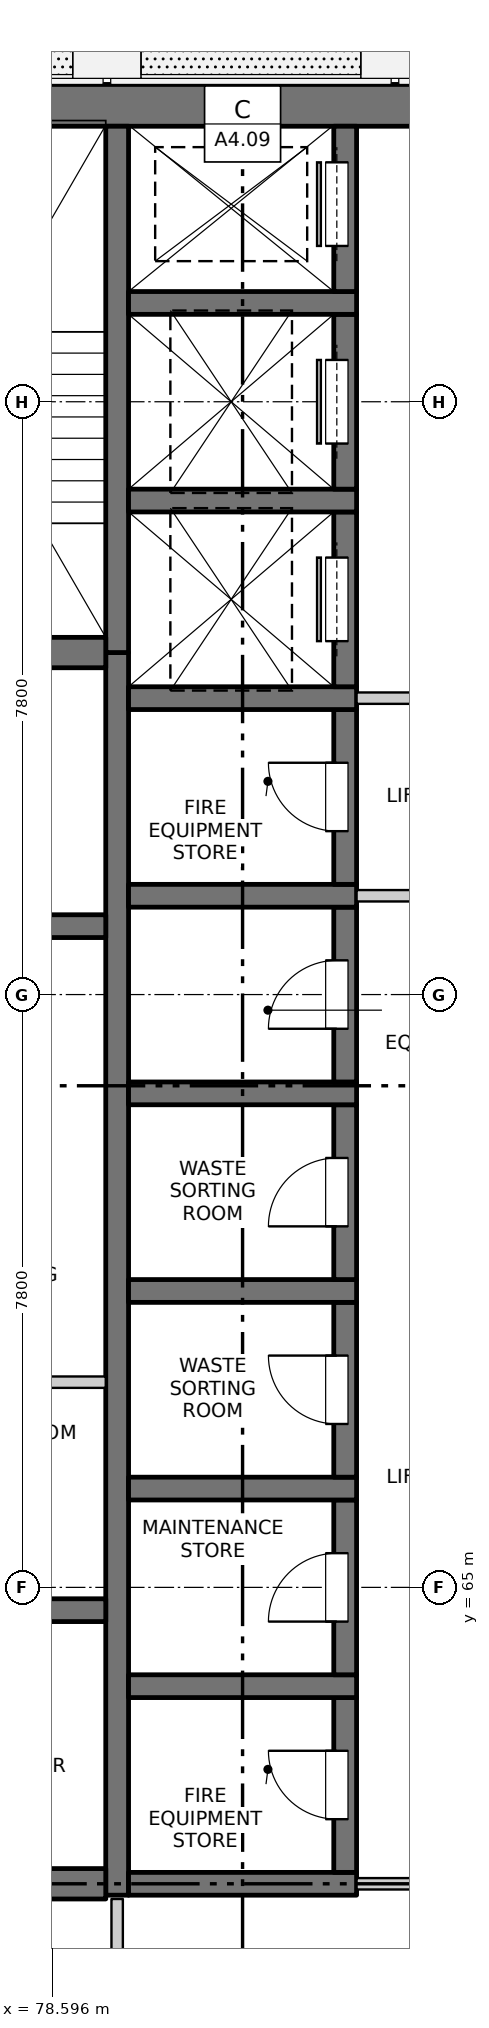
"""IFC4 building model, lengths in metres.
Left out: names, types, materials, properties, quantities, classifications, styles, units other than length and angle.
Written with IfcOpenShell. Run it as: python <this file> out.ifc"""

import sys

from ifc_helpers import new_model, si_unit, direction, frame, frame_2d, origin, place, context, subcontext, project, spatial, rectangle, extrude, element, fill, save


model = new_model("IFC4")
c1 = context("Model", 3, precision=1e-05, world=origin(), true_north=direction((0.0, 1.0)))
c2 = subcontext(c1, "Body", "Model", "MODEL_VIEW")
j1 = project(units=[si_unit("LENGTHUNIT", "METRE"), si_unit("PLANEANGLEUNIT", "RADIAN")], contexts=[c1])
p1 = place(None, origin())
s1 = spatial("IfcSite", under=j1, at=p1, CompositionType="ELEMENT")
p2 = place(p1, origin())
s2 = spatial("IfcBuilding", under=s1, at=p2, CompositionType="ELEMENT")
p3 = place(p2, frame((0.0, 0.0, 179.2)))
s3 = spatial("IfcBuildingStorey", under=s2, at=p3, CompositionType="ELEMENT", Elevation=179.2)
p4 = place(p3, frame((75.525, 84.5, -0.3), z_axis=(0.0, 0.0, 1.0), x_axis=(1.0, 0.0, 0.0)))
e1 = element("IfcWall", 1, at=p4, inside=s3, PredefinedType="SOLIDWALL", context=c2, shape_type="SweptSolid", body=[
    extrude(rectangle(XDim=18.95, YDim=0.55, at=frame_2d((9.475, 0.0))), origin(), (0.0, 0.0, 1.0), 3.45),
])
p5 = place(p3, frame((79.45, 60.95, -0.3), z_axis=(0.0, 0.0, 1.0), x_axis=(0.0, 1.0, 0.0)))
e2 = element("IfcWall", 2, at=p5, inside=s3, PredefinedType="SOLIDWALL", context=c2, shape_type="SweptSolid", body=[
    extrude(rectangle(XDim=16.35, YDim=0.3, at=frame_2d((8.175, 0.0))), origin(), (0.0, 0.0, 1.0), 3.45),
])
p6 = place(p3, frame((79.45, 77.3, -0.3), z_axis=(0.0, 0.0, 1.0), x_axis=(0.0, 1.0, 0.0)))
e3 = element("IfcWall", 3, at=p6, inside=s3, PredefinedType="SOLIDWALL", context=c2, shape_type="SweptSolid", body=[
    extrude(rectangle(XDim=6.925, YDim=0.3, at=frame_2d((3.462, 0.0))), origin(), (0.0, 0.0, 1.0), 3.45),
])
p7 = place(p3, frame((79.6, 61.1, -0.3), z_axis=(0.0, 0.0, 1.0), x_axis=(1.0, 0.0, 0.0)))
e4 = element("IfcWall", 4, at=p7, inside=s3, PredefinedType="SOLIDWALL", context=c2, shape_type="SweptSolid", body=[
    extrude(rectangle(XDim=3.0, YDim=0.3, at=frame_2d((1.5, 0.0))), origin(), (0.0, 0.0, 1.0), 3.45),
])
p8 = place(p3, frame((82.45, 61.25, -0.3), z_axis=(0.0, 0.0, 1.0), x_axis=(0.0, 1.0, 0.0)))
e5 = element("IfcWall", 5, at=p8, inside=s3, PredefinedType="SOLIDWALL", context=c2, shape_type="SweptSolid", body=[
    extrude(rectangle(XDim=2.3, YDim=0.3, at=frame_2d((1.15, 0.0))), origin(), (0.0, 0.0, 1.0), 3.45),
])
p9 = place(p8, frame((0.7, 0.0, 0.3)))
e6 = element("IfcOpeningElement", 6, at=p9, cuts=e5, PredefinedType="OPENING", context=c2, shape_type="SweptSolid", body=[
    extrude(rectangle(XDim=0.9, YDim=2.1, at=frame_2d((0.45, 1.05))), frame((0.0, 0.16, 0.0), z_axis=(0.0, -1.0, 0.0), x_axis=(1.0, 0.0, 0.0)), (0.0, 0.0, 1.0), 0.32),
])
p10 = place(p3, frame((79.6, 63.7, -0.3), z_axis=(0.0, 0.0, 1.0), x_axis=(1.0, 0.0, 0.0)))
e7 = element("IfcWall", 7, at=p10, inside=s3, PredefinedType="SOLIDWALL", context=c2, shape_type="SweptSolid", body=[
    extrude(rectangle(XDim=3.0, YDim=0.3, at=frame_2d((1.5, 0.0))), origin(), (0.0, 0.0, 1.0), 3.45),
])
p11 = place(p3, frame((82.45, 63.85, -0.3), z_axis=(0.0, 0.0, 1.0), x_axis=(0.0, 1.0, 0.0)))
e8 = element("IfcWall", 8, at=p11, inside=s3, PredefinedType="SOLIDWALL", context=c2, shape_type="SweptSolid", body=[
    extrude(rectangle(XDim=2.3, YDim=0.3, at=frame_2d((1.15, 0.0))), origin(), (0.0, 0.0, 1.0), 3.45),
])
p12 = place(p11, frame((0.7, 0.0, 0.3)))
e9 = element("IfcOpeningElement", 9, at=p12, cuts=e8, PredefinedType="OPENING", context=c2, shape_type="SweptSolid", body=[
    extrude(rectangle(XDim=0.9, YDim=2.1, at=frame_2d((0.45, 1.05))), frame((0.0, 0.16, 0.0), z_axis=(0.0, -1.0, 0.0), x_axis=(1.0, 0.0, 0.0)), (0.0, 0.0, 1.0), 0.32),
])
p13 = place(p3, frame((79.6, 66.3, -0.3), z_axis=(0.0, 0.0, 1.0), x_axis=(1.0, 0.0, 0.0)))
e10 = element("IfcWall", 10, at=p13, inside=s3, PredefinedType="SOLIDWALL", context=c2, shape_type="SweptSolid", body=[
    extrude(rectangle(XDim=3.0, YDim=0.3, at=frame_2d((1.5, 0.0))), origin(), (0.0, 0.0, 1.0), 3.45),
])
p14 = place(p3, frame((82.45, 66.45, -0.3), z_axis=(0.0, 0.0, 1.0), x_axis=(0.0, 1.0, 0.0)))
e11 = element("IfcWall", 11, at=p14, inside=s3, PredefinedType="SOLIDWALL", context=c2, shape_type="SweptSolid", body=[
    extrude(rectangle(XDim=2.3, YDim=0.3, at=frame_2d((1.15, 0.0))), origin(), (0.0, 0.0, 1.0), 3.45),
])
p15 = place(p14, frame((0.7, 0.0, 0.3)))
e12 = element("IfcOpeningElement", 12, at=p15, cuts=e11, PredefinedType="OPENING", context=c2, shape_type="SweptSolid", body=[
    extrude(rectangle(XDim=0.9, YDim=2.1, at=frame_2d((0.45, 1.05))), frame((0.0, 0.16, 0.0), z_axis=(0.0, -1.0, 0.0), x_axis=(1.0, 0.0, 0.0)), (0.0, 0.0, 1.0), 0.32),
])
p16 = place(p3, frame((79.6, 68.9, -0.3), z_axis=(0.0, 0.0, 1.0), x_axis=(1.0, 0.0, 0.0)))
e13 = element("IfcWall", 13, at=p16, inside=s3, PredefinedType="SOLIDWALL", context=c2, shape_type="SweptSolid", body=[
    extrude(rectangle(XDim=3.0, YDim=0.3, at=frame_2d((1.5, 0.0))), origin(), (0.0, 0.0, 1.0), 3.45),
])
p17 = place(p3, frame((82.45, 69.05, -0.3), z_axis=(0.0, 0.0, 1.0), x_axis=(0.0, 1.0, 0.0)))
e14 = element("IfcWall", 14, at=p17, inside=s3, PredefinedType="SOLIDWALL", context=c2, shape_type="SweptSolid", body=[
    extrude(rectangle(XDim=2.3, YDim=0.3, at=frame_2d((1.15, 0.0))), origin(), (0.0, 0.0, 1.0), 3.45),
])
p18 = place(p17, frame((0.7, 0.0, 0.3)))
e15 = element("IfcOpeningElement", 15, at=p18, cuts=e14, PredefinedType="OPENING", context=c2, shape_type="SweptSolid", body=[
    extrude(rectangle(XDim=0.9, YDim=2.1, at=frame_2d((0.45, 1.05))), frame((0.0, 0.16, 0.0), z_axis=(0.0, -1.0, 0.0), x_axis=(1.0, 0.0, 0.0)), (0.0, 0.0, 1.0), 0.32),
])
p19 = place(p3, frame((79.6, 71.5, -0.3), z_axis=(0.0, 0.0, 1.0), x_axis=(1.0, 0.0, 0.0)))
e16 = element("IfcWall", 16, at=p19, inside=s3, PredefinedType="SOLIDWALL", context=c2, shape_type="SweptSolid", body=[
    extrude(rectangle(XDim=3.0, YDim=0.3, at=frame_2d((1.5, 0.0))), origin(), (0.0, 0.0, 1.0), 3.45),
])
p20 = place(p3, frame((82.45, 71.65, -0.3), z_axis=(0.0, 0.0, 1.0), x_axis=(0.0, 1.0, 0.0)))
e17 = element("IfcWall", 17, at=p20, inside=s3, PredefinedType="SOLIDWALL", context=c2, shape_type="SweptSolid", body=[
    extrude(rectangle(XDim=2.3, YDim=0.3, at=frame_2d((1.15, 0.0))), origin(), (0.0, 0.0, 1.0), 3.45),
])
p21 = place(p20, frame((0.7, 0.0, 0.3)))
e18 = element("IfcOpeningElement", 18, at=p21, cuts=e17, PredefinedType="OPENING", context=c2, shape_type="SweptSolid", body=[
    extrude(rectangle(XDim=0.9, YDim=2.1, at=frame_2d((0.45, 1.05))), frame((0.0, 0.16, 0.0), z_axis=(0.0, -1.0, 0.0), x_axis=(1.0, 0.0, 0.0)), (0.0, 0.0, 1.0), 0.32),
])
p22 = place(p3, frame((79.6, 74.1, -0.3), z_axis=(0.0, 0.0, 1.0), x_axis=(1.0, 0.0, 0.0)))
e19 = element("IfcWall", 19, at=p22, inside=s3, PredefinedType="SOLIDWALL", context=c2, shape_type="SweptSolid", body=[
    extrude(rectangle(XDim=3.0, YDim=0.3, at=frame_2d((1.5, 0.0))), origin(), (0.0, 0.0, 1.0), 3.45),
])
p23 = place(p3, frame((82.45, 74.25, -0.3), z_axis=(0.0, 0.0, 1.0), x_axis=(0.0, 1.0, 0.0)))
e20 = element("IfcWall", 20, at=p23, inside=s3, PredefinedType="SOLIDWALL", context=c2, shape_type="SweptSolid", body=[
    extrude(rectangle(XDim=2.3, YDim=0.3, at=frame_2d((1.15, 0.0))), origin(), (0.0, 0.0, 1.0), 3.45),
])
p24 = place(p23, frame((0.7, 0.0, 0.3)))
e21 = element("IfcOpeningElement", 21, at=p24, cuts=e20, PredefinedType="OPENING", context=c2, shape_type="SweptSolid", body=[
    extrude(rectangle(XDim=0.9, YDim=2.1, at=frame_2d((0.45, 1.05))), frame((0.0, 0.16, 0.0), z_axis=(0.0, -1.0, 0.0), x_axis=(1.0, 0.0, 0.0)), (0.0, 0.0, 1.0), 0.32),
])
p25 = place(p3, frame((79.6, 76.7, -0.3), z_axis=(0.0, 0.0, 1.0), x_axis=(1.0, 0.0, 0.0)))
e22 = element("IfcWall", 22, at=p25, inside=s3, PredefinedType="SOLIDWALL", context=c2, shape_type="SweptSolid", body=[
    extrude(rectangle(XDim=3.0, YDim=0.3, at=frame_2d((1.5, 0.0))), origin(), (0.0, 0.0, 1.0), 3.45),
])
p26 = place(p3, frame((82.45, 76.85, -0.3), z_axis=(0.0, 0.0, 1.0), x_axis=(0.0, 1.0, 0.0)))
e23 = element("IfcWall", 23, at=p26, inside=s3, PredefinedType="SOLIDWALL", context=c2, shape_type="SweptSolid", body=[
    extrude(rectangle(XDim=2.3, YDim=0.3, at=frame_2d((1.15, 0.0))), origin(), (0.0, 0.0, 1.0), 3.45),
])
p27 = place(p26, frame((0.6, 0.0, 0.3)))
e24 = element("IfcOpeningElement", 24, at=p27, cuts=e23, PredefinedType="OPENING", context=c2, shape_type="SweptSolid", body=[
    extrude(rectangle(XDim=1.1, YDim=2.1, at=frame_2d((0.55, 1.05))), frame((0.0, 0.16, 0.0), z_axis=(0.0, -1.0, 0.0), x_axis=(1.0, 0.0, 0.0)), (0.0, 0.0, 1.0), 0.32),
])
p28 = place(p3, frame((79.6, 79.3, -0.3), z_axis=(0.0, 0.0, 1.0), x_axis=(1.0, 0.0, 0.0)))
e25 = element("IfcWall", 25, at=p28, inside=s3, PredefinedType="SOLIDWALL", context=c2, shape_type="SweptSolid", body=[
    extrude(rectangle(XDim=3.0, YDim=0.3, at=frame_2d((1.5, 0.0))), origin(), (0.0, 0.0, 1.0), 3.45),
])
p29 = place(p3, frame((82.45, 79.45, -0.3), z_axis=(0.0, 0.0, 1.0), x_axis=(0.0, 1.0, 0.0)))
e26 = element("IfcWall", 26, at=p29, inside=s3, PredefinedType="SOLIDWALL", context=c2, shape_type="SweptSolid", body=[
    extrude(rectangle(XDim=2.3, YDim=0.3, at=frame_2d((1.15, 0.0))), origin(), (0.0, 0.0, 1.0), 3.45),
])
p30 = place(p29, frame((0.6, 0.0, 0.3)))
e27 = element("IfcOpeningElement", 27, at=p30, cuts=e26, PredefinedType="OPENING", context=c2, shape_type="SweptSolid", body=[
    extrude(rectangle(XDim=1.1, YDim=2.1, at=frame_2d((0.55, 1.05))), frame((0.0, 0.16, 0.0), z_axis=(0.0, -1.0, 0.0), x_axis=(1.0, 0.0, 0.0)), (0.0, 0.0, 1.0), 0.32),
])
p31 = place(p3, frame((79.6, 81.9, -0.3), z_axis=(0.0, 0.0, 1.0), x_axis=(1.0, 0.0, 0.0)))
e28 = element("IfcWall", 28, at=p31, inside=s3, PredefinedType="SOLIDWALL", context=c2, shape_type="SweptSolid", body=[
    extrude(rectangle(XDim=3.0, YDim=0.3, at=frame_2d((1.5, 0.0))), origin(), (0.0, 0.0, 1.0), 3.45),
])
p32 = place(p3, frame((82.45, 82.05, -0.3), z_axis=(0.0, 0.0, 1.0), x_axis=(0.0, 1.0, 0.0)))
e29 = element("IfcWall", 29, at=p32, inside=s3, PredefinedType="SOLIDWALL", context=c2, shape_type="SweptSolid", body=[
    extrude(rectangle(XDim=2.175, YDim=0.3, at=frame_2d((1.087, 0.0))), origin(), (0.0, 0.0, 1.0), 3.45),
])
p33 = place(p32, frame((0.6, 0.0, 0.3)))
e30 = element("IfcOpeningElement", 30, at=p33, cuts=e29, PredefinedType="OPENING", context=c2, shape_type="SweptSolid", body=[
    extrude(rectangle(XDim=1.1, YDim=2.1, at=frame_2d((0.55, 1.05))), frame((0.0, 0.16, 0.0), z_axis=(0.0, -1.0, 0.0), x_axis=(1.0, 0.0, 0.0)), (0.0, 0.0, 1.0), 0.32),
])
p34 = place(p3, frame((75.525, 61.1, -0.3), z_axis=(0.0, 0.0, 1.0), x_axis=(1.0, 0.0, 0.0)))
e31 = element("IfcWall", 31, at=p34, inside=s3, PredefinedType="SOLIDWALL", context=c2, shape_type="SweptSolid", body=[
    extrude(rectangle(XDim=3.775, YDim=0.4, at=frame_2d((1.888, 0.0))), origin(), (0.0, 0.0, 1.0), 3.45),
])
for number, where, z_axis, x_axis in (
    (32, (75.525, 64.7, -0.3), (0.0, 0.0, 1.0), (1.0, 0.0, 0.0)),
    (33, (75.525, 73.7, -0.3), (0.0, 0.0, 1.0), (1.0, 0.0, 0.0)),
):
    element("IfcWall", number, at=place(p3, frame(where, z_axis=z_axis, x_axis=x_axis)), inside=s3, PredefinedType="SOLIDWALL", context=c2, shape_type="SweptSolid", body=[
        extrude(rectangle(XDim=3.775, YDim=0.3, at=frame_2d((1.888, 0.0))), origin(), (0.0, 0.0, 1.0), 3.45),
    ])
p35 = place(p3, frame((75.525, 77.3, -0.3), z_axis=(0.0, 0.0, 1.0), x_axis=(1.0, 0.0, 0.0)))
e34 = element("IfcWall", 34, at=p35, inside=s3, PredefinedType="SOLIDWALL", context=c2, shape_type="SweptSolid", body=[
    extrude(rectangle(XDim=3.775, YDim=0.4, at=frame_2d((1.888, 0.0))), origin(), (0.0, 0.0, 1.0), 3.45),
])
p36 = place(p3, frame((82.6, 61.1, 0.0), z_axis=(0.0, 0.0, 1.0), x_axis=(1.0, 0.0, 0.0)))
e35 = element("IfcWall", 35, at=p36, inside=s3, PredefinedType="PARTITIONING", context=c2, shape_type="SweptSolid", body=[
    extrude(rectangle(XDim=4.8, YDim=0.15, at=frame_2d((2.4, 0.0))), origin(), (0.0, 0.0, 1.0), 3.15),
])
p37 = place(p36, frame((1.5, 0.0, 0.0)))
e36 = element("IfcOpeningElement", 36, at=p37, cuts=e35, PredefinedType="OPENING", context=c2, shape_type="SweptSolid", body=[
    extrude(rectangle(XDim=1.8, YDim=2.1, at=frame_2d((0.9, 1.05))), frame((0.0, 0.085, 0.0), z_axis=(0.0, -1.0, 0.0), x_axis=(1.0, 0.0, 0.0)), (0.0, 0.0, 1.0), 0.17),
])
p38 = place(p3, frame((75.525, 67.7, 0.0), z_axis=(0.0, 0.0, 1.0), x_axis=(1.0, 0.0, 0.0)))
e37 = element("IfcWall", 37, at=p38, inside=s3, PredefinedType="PARTITIONING", context=c2, shape_type="SweptSolid", body=[
    extrude(rectangle(XDim=3.775, YDim=0.15, at=frame_2d((1.887, 0.0))), origin(), (0.0, 0.0, 1.0), 3.15),
])
p39 = place(p3, frame((82.6, 74.1, 0.0), z_axis=(0.0, 0.0, 1.0), x_axis=(1.0, 0.0, 0.0)))
e38 = element("IfcWall", 38, at=p39, inside=s3, PredefinedType="PARTITIONING", context=c2, shape_type="SweptSolid", body=[
    extrude(rectangle(XDim=4.8, YDim=0.15, at=frame_2d((2.4, 0.0))), origin(), (0.0, 0.0, 1.0), 3.15),
])
p40 = place(p39, frame((1.5, 0.0, 0.0)))
e39 = element("IfcOpeningElement", 39, at=p40, cuts=e38, PredefinedType="OPENING", context=c2, shape_type="SweptSolid", body=[
    extrude(rectangle(XDim=1.8, YDim=2.1, at=frame_2d((0.9, 1.05))), frame((0.0, 0.085, 0.0), z_axis=(0.0, -1.0, 0.0), x_axis=(1.0, 0.0, 0.0)), (0.0, 0.0, 1.0), 0.17),
])
p41 = place(p3, frame((82.6, 76.7, 0.0), z_axis=(0.0, 0.0, 1.0), x_axis=(1.0, 0.0, 0.0)))
e40 = element("IfcWall", 40, at=p41, inside=s3, PredefinedType="PARTITIONING", context=c2, shape_type="SweptSolid", body=[
    extrude(rectangle(XDim=4.8, YDim=0.15, at=frame_2d((2.4, 0.0))), origin(), (0.0, 0.0, 1.0), 3.15),
])
p42 = place(p41, frame((1.5, 0.0, 0.0)))
e41 = element("IfcOpeningElement", 41, at=p42, cuts=e40, PredefinedType="OPENING", context=c2, shape_type="SweptSolid", body=[
    extrude(rectangle(XDim=1.8, YDim=2.1, at=frame_2d((0.9, 1.05))), frame((0.0, 0.085, 0.0), z_axis=(0.0, -1.0, 0.0), x_axis=(1.0, 0.0, 0.0)), (0.0, 0.0, 1.0), 0.17),
])
p43 = place(p3, frame((79.45, 55.525, 0.0), z_axis=(0.0, 0.0, 1.0), x_axis=(0.0, 1.0, 0.0)))
e42 = element("IfcWall", 42, at=p43, inside=s3, PredefinedType="PARTITIONING", context=c2, shape_type="SweptSolid", body=[
    extrude(rectangle(XDim=5.375, YDim=0.15, at=frame_2d((2.688, 0.0))), origin(), (0.0, 0.0, 1.0), 3.15),
])
p44 = place(p43, frame((2.175, 0.0, 0.0)))
e43 = element("IfcOpeningElement", 43, at=p44, cuts=e42, PredefinedType="OPENING", context=c2, shape_type="SweptSolid", body=[
    extrude(rectangle(XDim=0.9, YDim=2.1, at=frame_2d((0.45, 1.05))), frame((0.0, 0.085, 0.0), z_axis=(0.0, -1.0, 0.0), x_axis=(1.0, 0.0, 0.0)), (0.0, 0.0, 1.0), 0.17),
])
p45 = place(p9, origin())
e44 = element("IfcDoor", 44, at=p45, inside=s3, OperationType="SINGLE_SWING_RIGHT", PredefinedType="DOOR", context=c2, shape_type="SweptSolid", body=[
    extrude(rectangle(XDim=0.9, YDim=2.1, at=frame_2d((0.45, 1.05))), frame((0.0, 0.135, 0.0), z_axis=(0.0, -1.0, 0.0), x_axis=(1.0, 0.0, 0.0)), (0.0, 0.0, 1.0), 0.05),
])
fill(e6, e44)
p46 = place(p12, origin())
e45 = element("IfcDoor", 45, at=p46, inside=s3, OperationType="SINGLE_SWING_LEFT", PredefinedType="DOOR", context=c2, shape_type="SweptSolid", body=[
    extrude(rectangle(XDim=0.9, YDim=2.1, at=frame_2d((0.45, 1.05))), frame((0.0, 0.135, 0.0), z_axis=(0.0, -1.0, 0.0), x_axis=(1.0, 0.0, 0.0)), (0.0, 0.0, 1.0), 0.05),
])
fill(e9, e45)
p47 = place(p15, origin())
e46 = element("IfcDoor", 46, at=p47, inside=s3, OperationType="SINGLE_SWING_RIGHT", PredefinedType="DOOR", context=c2, shape_type="SweptSolid", body=[
    extrude(rectangle(XDim=0.9, YDim=2.1, at=frame_2d((0.45, 1.05))), frame((0.0, 0.135, 0.0), z_axis=(0.0, -1.0, 0.0), x_axis=(1.0, 0.0, 0.0)), (0.0, 0.0, 1.0), 0.05),
])
fill(e12, e46)
p48 = place(p18, origin())
e47 = element("IfcDoor", 47, at=p48, inside=s3, OperationType="SINGLE_SWING_LEFT", PredefinedType="DOOR", context=c2, shape_type="SweptSolid", body=[
    extrude(rectangle(XDim=0.9, YDim=2.1, at=frame_2d((0.45, 1.05))), frame((0.0, 0.135, 0.0), z_axis=(0.0, -1.0, 0.0), x_axis=(1.0, 0.0, 0.0)), (0.0, 0.0, 1.0), 0.05),
])
fill(e15, e47)
p49 = place(p21, origin())
e48 = element("IfcDoor", 48, at=p49, inside=s3, OperationType="SINGLE_SWING_LEFT", PredefinedType="DOOR", context=c2, shape_type="SweptSolid", body=[
    extrude(rectangle(XDim=0.9, YDim=2.1, at=frame_2d((0.45, 1.05))), frame((0.0, 0.135, 0.0), z_axis=(0.0, -1.0, 0.0), x_axis=(1.0, 0.0, 0.0)), (0.0, 0.0, 1.0), 0.05),
])
fill(e18, e48)
p50 = place(p24, origin())
e49 = element("IfcDoor", 49, at=p50, inside=s3, OperationType="SINGLE_SWING_RIGHT", PredefinedType="DOOR", context=c2, shape_type="SweptSolid", body=[
    extrude(rectangle(XDim=0.9, YDim=2.1, at=frame_2d((0.45, 1.05))), frame((0.0, 0.135, 0.0), z_axis=(0.0, -1.0, 0.0), x_axis=(1.0, 0.0, 0.0)), (0.0, 0.0, 1.0), 0.05),
])
fill(e21, e49)
p51 = place(p27, origin())
e50 = element("IfcDoor", 50, at=p51, inside=s3, OperationType="SLIDING_TO_LEFT", PredefinedType="DOOR", context=c2, shape_type="SweptSolid", body=[
    extrude(rectangle(XDim=1.1, YDim=2.1, at=frame_2d((0.55, 1.05))), frame((0.0, 0.135, 0.0), z_axis=(0.0, -1.0, 0.0), x_axis=(1.0, 0.0, 0.0)), (0.0, 0.0, 1.0), 0.05),
])
fill(e24, e50)
p52 = place(p30, origin())
e51 = element("IfcDoor", 51, at=p52, inside=s3, OperationType="SLIDING_TO_LEFT", PredefinedType="DOOR", context=c2, shape_type="SweptSolid", body=[
    extrude(rectangle(XDim=1.1, YDim=2.1, at=frame_2d((0.55, 1.05))), frame((0.0, 0.135, 0.0), z_axis=(0.0, -1.0, 0.0), x_axis=(1.0, 0.0, 0.0)), (0.0, 0.0, 1.0), 0.05),
])
fill(e27, e51)
p53 = place(p33, origin())
e52 = element("IfcDoor", 52, at=p53, inside=s3, OperationType="SLIDING_TO_RIGHT", PredefinedType="DOOR", context=c2, shape_type="SweptSolid", body=[
    extrude(rectangle(XDim=1.1, YDim=2.1, at=frame_2d((0.55, 1.05))), frame((0.0, 0.135, 0.0), z_axis=(0.0, -1.0, 0.0), x_axis=(1.0, 0.0, 0.0)), (0.0, 0.0, 1.0), 0.05),
])
fill(e30, e52)
save(model, sys.argv[1])
